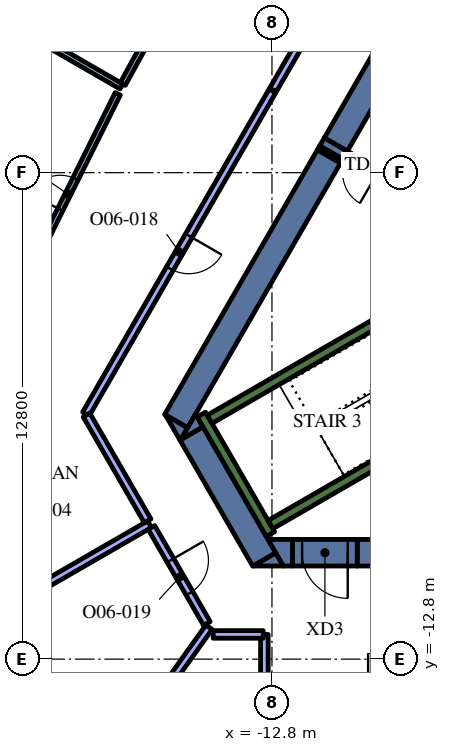
"""IFC4 building model, lengths in metres.
Left out: names, types, materials, properties, quantities, classifications, styles, units other than length and angle.
Written with IfcOpenShell. Run it as: python <this file> out.ifc"""

import sys

from ifc_helpers import new_model, si_unit, direction, frame, frame_2d, origin, place, context, subcontext, project, spatial, polyline, rectangle, outline, extrude, element, fill, save


model = new_model("IFC4")
c1 = context("Model", 3, precision=1e-05, world=origin(), true_north=direction((0.0, 1.0)))
c2 = subcontext(c1, "Body", "Model", "MODEL_VIEW")
j1 = project(units=[si_unit("LENGTHUNIT", "METRE"), si_unit("PLANEANGLEUNIT", "RADIAN")], contexts=[c1])
p1 = place(None, origin())
s1 = spatial("IfcSite", under=j1, at=p1, CompositionType="ELEMENT")
p2 = place(p1, origin())
s2 = spatial("IfcBuilding", under=s1, at=p2, CompositionType="ELEMENT")
p3 = place(p2, frame((0.0, 0.0, 210.0)))
s3 = spatial("IfcBuildingStorey", under=s2, at=p3, CompositionType="ELEMENT", Elevation=210.0)
p4 = place(p3, frame((-11.301, 0.426, 0.0), z_axis=(0.0, 0.0, 1.0), x_axis=(0.50111559984, 0.865380353138, 0.0)))
e1 = element("IfcWall", 1, at=p4, inside=s3, PredefinedType="SOLIDWALL", context=c2, shape_type="SweptSolid", body=[
    extrude(rectangle(XDim=0.121, YDim=0.7, at=frame_2d((0.061, 0.0))), origin(), (0.0, 0.0, 1.0), 4.2),
])
p5 = place(p3, frame((-15.321, -6.537, 0.0), z_axis=(0.0, 0.0, 1.0), x_axis=(0.500000268222, 0.866025248926, 0.0)))
e2 = element("IfcWall", 2, at=p5, inside=s3, PredefinedType="SOLIDWALL", context=c2, shape_type="SweptSolid", body=[
    extrude(rectangle(XDim=8.038, YDim=0.7, at=frame_2d((4.019, 0.0))), origin(), (0.0, 0.0, 1.0), 4.2),
])
p6 = place(p3, origin())
e3 = element("IfcWall", 3, at=p6, inside=s3, PredefinedType="SOLIDWALL", context=c2, shape_type="SweptSolid", body=[
    extrude(outline(polyline([(-15.213, -7.05), (-15.601, -6.378), (-15.019, -6.714), (-15.213, -7.05)])), origin(), (0.0, 0.0, 1.0), 4.2),
])
p7 = place(p3, frame((-4.696, 11.867, 0.0), z_axis=(0.0, 0.0, 1.0), x_axis=(-0.500003726532, -0.866023252259, 0.0)))
e4 = element("IfcWall", 4, at=p7, inside=s3, PredefinedType="SOLIDWALL", context=c2, shape_type="SweptSolid", body=[
    extrude(rectangle(XDim=12.848, YDim=0.7, at=frame_2d((6.424, 0.0))), origin(), (0.0, 0.0, 1.0), 4.2),
])
e5 = element("IfcWall", 5, at=p6, inside=s3, PredefinedType="SOLIDWALL", context=c2, shape_type="SweptSolid", body=[
    extrude(outline(polyline([(-11.543, 0.708), (-11.424, 0.914), (-10.843, 0.578), (-10.962, 0.372), (-11.543, 0.708)])), origin(), (0.0, 0.0, 1.0), 4.2),
])
p8 = place(p3, frame((-14.917, -6.863, 0.0), z_axis=(0.0, 0.0, 1.0), x_axis=(0.499972675833, -0.866041178825, 0.0)))
e6 = element("IfcWall", 6, at=p8, inside=s3, PredefinedType="SOLIDWALL", context=c2, shape_type="SweptSolid", body=[
    extrude(rectangle(XDim=3.829, YDim=0.7, at=frame_2d((1.915, 0.0))), origin(), (0.0, 0.0, 1.0), 4.2),
])
e7 = element("IfcWall", 7, at=p6, inside=s3, PredefinedType="SOLIDWALL", context=c2, shape_type="SweptSolid", body=[
    extrude(outline(polyline([(-14.809, -6.35), (-14.615, -6.686), (-15.197, -7.022), (-14.809, -6.35)])), origin(), (0.0, 0.0, 1.0), 4.2),
])
e8 = element("IfcWall", 8, at=p6, inside=s3, PredefinedType="SOLIDWALL", context=c2, shape_type="SweptSolid", body=[
    extrude(outline(polyline([(-12.5, -10.35), (-13.296, -10.35), (-12.698, -10.005), (-12.5, -10.35)])), origin(), (0.0, 0.0, 1.0), 4.2),
])
e9 = element("IfcWall", 9, at=p6, inside=s3, PredefinedType="SOLIDWALL", context=c2, shape_type="SweptSolid", body=[
    extrude(outline(polyline([(-12.257, -10.35), (-12.5, -10.35), (-12.904, -9.65), (-12.257, -9.65), (-12.257, -10.35)])), origin(), (0.0, 0.0, 1.0), 4.2),
])
p9 = place(p3, frame((-10.556, -10.0, 0.0), z_axis=(0.0, 0.0, 1.0), x_axis=(1.0, 0.0, 0.0)))
e10 = element("IfcWall", 10, at=p9, inside=s3, PredefinedType="SOLIDWALL", context=c2, shape_type="SweptSolid", body=[
    extrude(rectangle(XDim=19.461, YDim=0.7, at=frame_2d((9.73, 0.0))), origin(), (0.0, 0.0, 1.0), 4.2),
])
p10 = place(p3, frame((-12.84, -9.511, 0.0), z_axis=(0.0, 0.0, 1.0), x_axis=(-0.500048121057, 0.865997619297, 0.0)))
e11 = element("IfcWall", 11, at=p10, inside=s3, PredefinedType="SOLIDWALL", context=c2, shape_type="SweptSolid", body=[
    extrude(rectangle(XDim=3.634, YDim=0.25, at=frame_2d((1.817, 0.0))), origin(), (0.0, 0.0, 1.0), 4.2),
])
p11 = place(p3, frame((-14.44, -6.49, 0.0), z_axis=(0.0, 0.0, 1.0), x_axis=(0.866022966069, 0.500004222222, 0.0)))
e12 = element("IfcWall", 12, at=p11, inside=s3, PredefinedType="SOLIDWALL", context=c2, shape_type="SweptSolid", body=[
    extrude(rectangle(XDim=6.8, YDim=0.25, at=frame_2d((3.4, 0.0))), origin(), (0.0, 0.0, 1.0), 4.2),
])
p12 = place(p3, frame((-12.84, -9.261, 0.0), z_axis=(0.0, 0.0, 1.0), x_axis=(0.866016039709, 0.500016218704, 0.0)))
e13 = element("IfcWall", 13, at=p12, inside=s3, PredefinedType="SOLIDWALL", context=c2, shape_type="SweptSolid", body=[
    extrude(rectangle(XDim=7.05, YDim=0.25, at=frame_2d((3.525, 0.0))), origin(), (0.0, 0.0, 1.0), 4.2),
])
p13 = place(p3, frame((-10.556, -10.0, 0.0), z_axis=(0.0, 0.0, 1.0), x_axis=(-1.0, 0.0, 0.0)))
e14 = element("IfcWall", 14, at=p13, inside=s3, PredefinedType="SOLIDWALL", context=c2, shape_type="SweptSolid", body=[
    extrude(rectangle(XDim=1.7, YDim=0.7, at=frame_2d((0.85, 0.0))), origin(), (0.0, 0.0, 1.0), 4.2),
])
p14 = place(p13, frame((0.25, 0.0, 0.0)))
e15 = element("IfcOpeningElement", 15, at=p14, cuts=e14, PredefinedType="OPENING", context=c2, shape_type="SweptSolid", body=[
    extrude(rectangle(XDim=1.2, YDim=2.1, at=frame_2d((0.6, 1.05))), frame((0.0, 0.36, 0.0), z_axis=(0.0, -1.0, 0.0), x_axis=(1.0, 0.0, 0.0)), (0.0, 0.0, 1.0), 0.72),
])
p15 = place(p3, frame((-9.95, -0.075, 0.0), z_axis=(0.0, 0.0, 1.0), x_axis=(-0.865952669392, 0.500125958508, 0.0)))
e16 = element("IfcWall", 16, at=p15, inside=s3, PredefinedType="SOLIDWALL", context=c2, shape_type="SweptSolid", body=[
    extrude(rectangle(XDim=1.1, YDim=0.25, at=frame_2d((0.55, 0.0))), origin(), (0.0, 0.0, 1.0), 4.2),
])
p16 = place(p15, frame((0.1, 0.0, 0.0)))
e17 = element("IfcOpeningElement", 17, at=p16, cuts=e16, PredefinedType="OPENING", context=c2, shape_type="SweptSolid", body=[
    extrude(rectangle(XDim=0.9, YDim=2.1, at=frame_2d((0.45, 1.05))), frame((0.0, 0.135, 0.0), z_axis=(0.0, -1.0, 0.0), x_axis=(1.0, 0.0, 0.0)), (0.0, 0.0, 1.0), 0.27),
])
p17 = place(p3, frame((-18.709, -17.916, 0.0), z_axis=(0.0, 0.0, 1.0), x_axis=(0.581023578026, 0.813886725397, 0.0)))
e18 = element("IfcWall", 18, at=p17, inside=s3, PredefinedType="PARTITIONING", context=c2, shape_type="SweptSolid", body=[
    extrude(rectangle(XDim=7.318, YDim=0.2, at=frame_2d((3.659, 0.0))), origin(), (0.0, 0.0, 1.0), 3.45),
])
p18 = place(p3, frame((-13.0, -12.15, 0.0), z_axis=(0.0, 0.0, 1.0), x_axis=(0.0, -1.0, 0.0)))
e19 = element("IfcWall", 19, at=p18, inside=s3, PredefinedType="PARTITIONING", context=c2, shape_type="SweptSolid", body=[
    extrude(rectangle(XDim=1.5, YDim=0.2, at=frame_2d((0.75, 0.0))), origin(), (0.0, 0.0, 1.0), 3.45),
])
p19 = place(p3, frame((-14.347, -12.15, 0.0), z_axis=(0.0, 0.0, 1.0), x_axis=(1.0, 0.0, 0.0)))
e20 = element("IfcWall", 20, at=p19, inside=s3, PredefinedType="PARTITIONING", context=c2, shape_type="SweptSolid", body=[
    extrude(rectangle(XDim=1.317, YDim=0.2, at=frame_2d((0.659, 0.0))), origin(), (0.0, 0.0, 1.0), 3.45),
])
p20 = place(p3, frame((-16.761, 2.268, 0.0), z_axis=(0.0, 0.0, 1.0), x_axis=(-0.866022812202, 0.500004488726, 0.0)))
e21 = element("IfcWall", 21, at=p20, inside=s3, PredefinedType="PARTITIONING", context=c2, shape_type="SweptSolid", body=[
    extrude(rectangle(XDim=3.247, YDim=0.15, at=frame_2d((1.624, 0.0))), origin(), (0.0, 0.0, 1.0), 3.45),
])
p21 = place(p3, frame((-16.725, 2.333, 0.0), z_axis=(0.0, 0.0, 1.0), x_axis=(0.480955103875, 0.876745224142, 0.0)))
e22 = element("IfcWall", 22, at=p21, inside=s3, PredefinedType="PARTITIONING", context=c2, shape_type="SweptSolid", body=[
    extrude(rectangle(XDim=6.129, YDim=0.15, at=frame_2d((3.064, 0.0))), origin(), (0.0, 0.0, 1.0), 3.45),
])
p22 = place(p21, frame((2.629, 0.0, 0.0)))
e23 = element("IfcOpeningElement", 23, at=p22, cuts=e22, PredefinedType="OPENING", context=c2, shape_type="SweptSolid", body=[
    extrude(rectangle(XDim=0.9, YDim=2.1, at=frame_2d((0.45, 1.05))), frame((0.0, 0.085, 0.0), z_axis=(0.0, -1.0, 0.0), x_axis=(1.0, 0.0, 0.0)), (0.0, 0.0, 1.0), 0.17),
])
p23 = place(p3, frame((-19.467, -3.175, 0.0), z_axis=(0.0, 0.0, 1.0), x_axis=(0.445180755526, 0.895440726631, 0.0)))
e24 = element("IfcWall", 24, at=p23, inside=s3, PredefinedType="PARTITIONING", context=c2, shape_type="SweptSolid", body=[
    extrude(rectangle(XDim=5.864, YDim=0.15, at=frame_2d((2.932, 0.0))), origin(), (0.0, 0.0, 1.0), 3.45),
])
p24 = place(p23, frame((2.464, 0.0, 0.0)))
e25 = element("IfcOpeningElement", 25, at=p24, cuts=e24, PredefinedType="OPENING", context=c2, shape_type="SweptSolid", body=[
    extrude(rectangle(XDim=0.9, YDim=2.1, at=frame_2d((0.45, 1.05))), frame((0.0, 0.085, 0.0), z_axis=(0.0, -1.0, 0.0), x_axis=(1.0, 0.0, 0.0)), (0.0, 0.0, 1.0), 0.17),
])
p25 = place(p3, frame((-16.021, -9.25, 0.0), z_axis=(0.0, 0.0, 1.0), x_axis=(-0.86601739438, -0.500013872438, 0.0)))
e26 = element("IfcWall", 26, at=p25, inside=s3, PredefinedType="PARTITIONING", context=c2, shape_type="SweptSolid", body=[
    extrude(rectangle(XDim=6.478, YDim=0.2, at=frame_2d((3.239, 0.0))), origin(), (0.0, 0.0, 1.0), 3.45),
])
p26 = place(p3, frame((-8.272, 9.972, 0.0), z_axis=(0.0, 0.0, 1.0), x_axis=(-0.5000018851, -0.866024315419, 0.0)))
e27 = element("IfcWall", 27, at=p26, inside=s3, PredefinedType="PARTITIONING", context=c2, shape_type="SweptSolid", body=[
    extrude(rectangle(XDim=9.0, YDim=0.2, at=frame_2d((4.5, 0.0))), origin(), (0.0, 0.0, 1.0), 3.45),
])
p27 = place(p3, frame((-12.787, 2.152, 0.0), z_axis=(0.0, 0.0, 1.0), x_axis=(-0.50000660679, -0.866021589319, 0.0)))
e28 = element("IfcWall", 28, at=p27, inside=s3, PredefinedType="PARTITIONING", context=c2, shape_type="SweptSolid", body=[
    extrude(rectangle(XDim=9.817, YDim=0.2, at=frame_2d((4.909, 0.0))), origin(), (0.0, 0.0, 1.0), 3.45),
])
p28 = place(p27, frame((4.4, 0.0, 0.0)))
e29 = element("IfcOpeningElement", 29, at=p28, cuts=e28, PredefinedType="OPENING", context=c2, shape_type="SweptSolid", body=[
    extrude(rectangle(XDim=1.0, YDim=2.1, at=frame_2d((0.5, 1.05))), frame((0.0, 0.11, 0.0), z_axis=(0.0, -1.0, 0.0), x_axis=(1.0, 0.0, 0.0)), (0.0, 0.0, 1.0), 0.22),
])
p29 = place(p3, frame((-17.681, -6.376, 0.0), z_axis=(0.0, 0.0, 1.0), x_axis=(0.500022299258, -0.866012528919, 0.0)))
e30 = element("IfcWall", 30, at=p29, inside=s3, PredefinedType="PARTITIONING", context=c2, shape_type="SweptSolid", body=[
    extrude(rectangle(XDim=3.219, YDim=0.2, at=frame_2d((1.609, 0.0))), origin(), (0.0, 0.0, 1.0), 3.45),
])
p30 = place(p3, frame((-15.971, -9.337, 0.0), z_axis=(0.0, 0.0, 1.0), x_axis=(0.500007233661, -0.866021227388, 0.0)))
e31 = element("IfcWall", 31, at=p30, inside=s3, PredefinedType="PARTITIONING", context=c2, shape_type="SweptSolid", body=[
    extrude(rectangle(XDim=2.919, YDim=0.2, at=frame_2d((1.459, 0.0))), origin(), (0.0, 0.0, 1.0), 3.45),
])
p31 = place(p30, frame((1.0, 0.0, 0.0)))
e32 = element("IfcOpeningElement", 32, at=p31, cuts=e31, PredefinedType="OPENING", context=c2, shape_type="SweptSolid", body=[
    extrude(rectangle(XDim=1.0, YDim=2.1, at=frame_2d((0.5, 1.05))), frame((0.0, 0.11, 0.0), z_axis=(0.0, -1.0, 0.0), x_axis=(1.0, 0.0, 0.0)), (0.0, 0.0, 1.0), 0.22),
])
p32 = place(p14, origin())
e33 = element("IfcDoor", 33, at=p32, inside=s3, OperationType="SINGLE_SWING_LEFT", PredefinedType="DOOR", context=c2, shape_type="SweptSolid", body=[
    extrude(rectangle(XDim=1.2, YDim=2.1, at=frame_2d((0.6, 1.05))), frame((0.0, 0.025, 0.0), z_axis=(0.0, -1.0, 0.0), x_axis=(1.0, 0.0, 0.0)), (0.0, 0.0, 1.0), 0.05),
])
fill(e15, e33)
p33 = place(p16, origin())
e34 = element("IfcDoor", 34, at=p33, inside=s3, OperationType="SINGLE_SWING_LEFT", PredefinedType="DOOR", context=c2, shape_type="SweptSolid", body=[
    extrude(rectangle(XDim=0.9, YDim=2.1, at=frame_2d((0.45, 1.05))), frame((0.0, 0.025, 0.0), z_axis=(0.0, -1.0, 0.0), x_axis=(1.0, 0.0, 0.0)), (0.0, 0.0, 1.0), 0.05),
])
fill(e17, e34)
p34 = place(p24, origin())
e35 = element("IfcDoor", 35, at=p34, inside=s3, OperationType="SINGLE_SWING_LEFT", PredefinedType="DOOR", context=c2, shape_type="SweptSolid", body=[
    extrude(rectangle(XDim=0.9, YDim=2.1, at=frame_2d((0.45, 1.05))), frame((0.0, 0.025, 0.0), z_axis=(0.0, -1.0, 0.0), x_axis=(1.0, 0.0, 0.0)), (0.0, 0.0, 1.0), 0.05),
])
fill(e25, e35)
p35 = place(p28, origin())
e36 = element("IfcDoor", 36, at=p35, inside=s3, OperationType="SINGLE_SWING_LEFT", PredefinedType="DOOR", context=c2, shape_type="SweptSolid", body=[
    extrude(rectangle(XDim=1.0, YDim=2.1, at=frame_2d((0.5, 1.05))), frame((0.0, 0.025, 0.0), z_axis=(0.0, -1.0, 0.0), x_axis=(1.0, 0.0, 0.0)), (0.0, 0.0, 1.0), 0.05),
])
fill(e29, e36)
p36 = place(p31, origin())
e37 = element("IfcDoor", 37, at=p36, inside=s3, OperationType="SINGLE_SWING_RIGHT", PredefinedType="DOOR", context=c2, shape_type="SweptSolid", body=[
    extrude(rectangle(XDim=1.0, YDim=2.1, at=frame_2d((0.5, 1.05))), frame((0.0, 0.025, 0.0), z_axis=(0.0, -1.0, 0.0), x_axis=(1.0, 0.0, 0.0)), (0.0, 0.0, 1.0), 0.05),
])
fill(e32, e37)
save(model, sys.argv[1])
